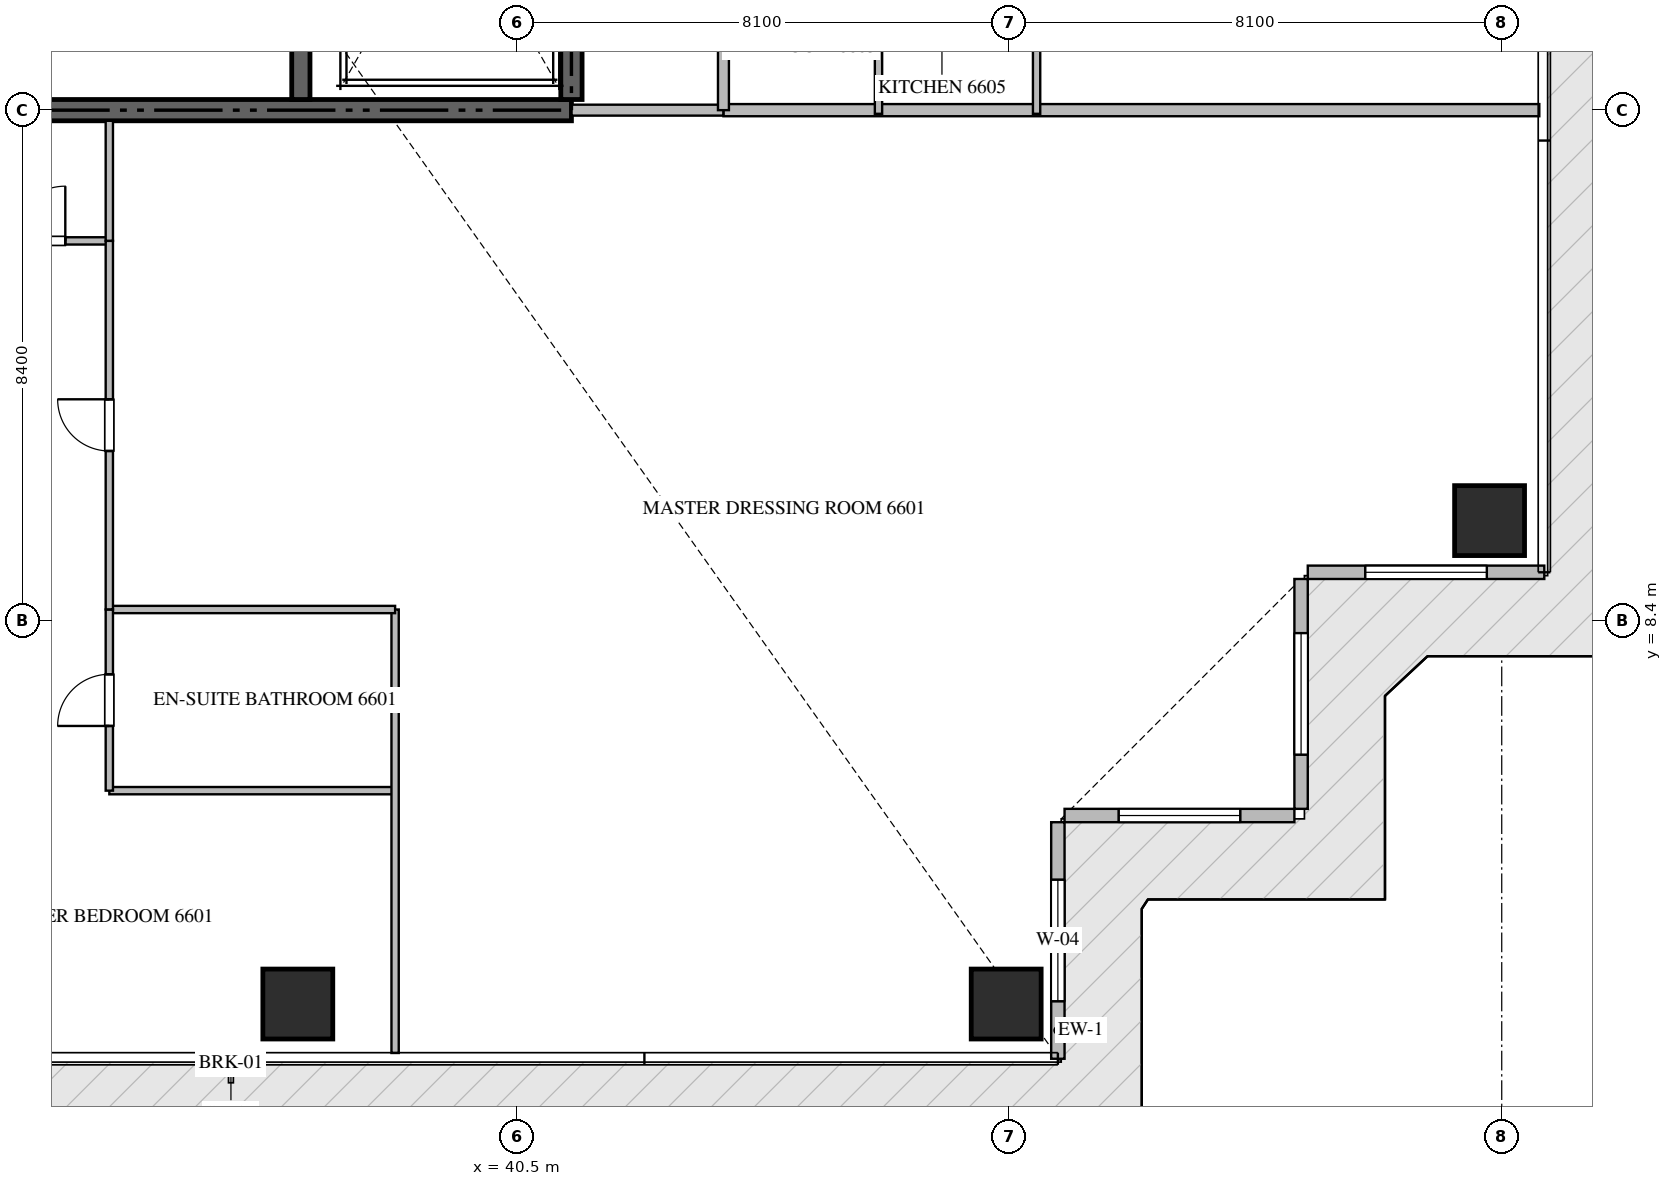
"""IFC4 building model, lengths in metres.
Left out: names, types, materials, properties, quantities, classifications, styles, units other than length and angle.
Written with IfcOpenShell. Run it as: python <this file> out.ifc"""

import sys

from ifc_helpers import new_model, si_unit, direction, frame, frame_2d, origin, origin_2d, place, context, subcontext, project, spatial, rectangle, extrude, source, transform, mapped, element, fill, save


model = new_model("IFC4")
c1 = context("Model", 3, precision=1e-05, world=origin(), true_north=direction((0.0, 1.0)))
c2 = subcontext(c1, "Body", "Model", "MODEL_VIEW")
j1 = project(units=[si_unit("LENGTHUNIT", "METRE"), si_unit("PLANEANGLEUNIT", "RADIAN")], contexts=[c1])
p1 = place(None, origin())
s1 = spatial("IfcSite", under=j1, at=p1, CompositionType="ELEMENT")
p2 = place(p1, origin())
s2 = spatial("IfcBuilding", under=s1, at=p2, CompositionType="ELEMENT")
p3 = place(p2, frame((0.0, 0.0, 264.35)))
s3 = spatial("IfcBuildingStorey", under=s2, at=p3, CompositionType="ELEMENT", Elevation=264.35)
p4 = place(p3, frame((23.4, 16.8, -0.26), z_axis=(0.0, 0.0, 1.0), x_axis=(1.0, 0.0, 0.0)))
e1 = element("IfcWall", 1, at=p4, inside=s3, PredefinedType="SHEAR", context=c2, shape_type="SweptSolid", body=[
    extrude(rectangle(XDim=18.0, YDim=0.35, at=frame_2d((9.0, 0.0))), origin(), (0.0, 0.0, 1.0), 3.848),
])
p5 = place(p3, frame((41.4, 16.975, -0.26), z_axis=(0.0, 0.0, 1.0), x_axis=(0.0, 1.0, 0.0)))
e2 = element("IfcWall", 2, at=p5, inside=s3, PredefinedType="SHEAR", context=c2, shape_type="SweptSolid", body=[
    extrude(rectangle(XDim=8.375, YDim=0.35, at=frame_2d((4.188, 0.0))), origin(), (0.0, 0.0, 1.0), 3.848),
])
p6 = place(p3, frame((36.95, 16.975, -0.26), z_axis=(0.0, 0.0, 1.0), x_axis=(0.0, 1.0, 0.0)))
e3 = element("IfcWall", 3, at=p6, inside=s3, PredefinedType="SHEAR", context=c2, shape_type="SweptSolid", body=[
    extrude(rectangle(XDim=8.375, YDim=0.3, at=frame_2d((4.188, 0.0))), origin(), (0.0, 0.0, 1.0), 3.848),
])
m1 = source(origin(), c2, "Body", "SweptSolid", [
    extrude(rectangle(XDim=1.15, YDim=1.15, at=origin_2d()), origin(), (0.0, 0.0, 1.0), 3.85),
])
for number, where, z_axis, x_axis in (
    (4, (36.9, 2.1, -0.26), (0.0, 0.0, 1.0), (1.0, 0.0, 0.0)),
    (5, (48.55, 2.1, -0.26), (0.0, 0.0, 1.0), (1.0, 0.0, 0.0)),
    (6, (56.5, 10.05, -0.26), (0.0, 0.0, 1.0), (1.0, 0.0, 0.0)),
):
    element("IfcColumn", number, at=place(p3, frame(where, z_axis=z_axis, x_axis=x_axis)), inside=s3, PredefinedType="COLUMN", context=c2, shape_type="MappedRepresentation", body=[
        mapped(m1, transform((0.0, 0.0, 0.0), scale=1.0)),
    ])
p7 = place(p3, frame((49.4, 1.2, 0.0), z_axis=(0.0, 0.0, 1.0), x_axis=(0.0, 1.0, 0.0)))
e7 = element("IfcWall", 7, at=p7, inside=s3, PredefinedType="ELEMENTEDWALL", context=c2, shape_type="SweptSolid", body=[
    extrude(rectangle(XDim=3.89, YDim=0.22, at=frame_2d((1.945, 0.0))), origin(), (0.0, 0.0, 1.0), 3.575),
])
p8 = place(p7, frame((0.945, 0.0, 0.65)))
e8 = element("IfcOpeningElement", 8, at=p8, cuts=e7, PredefinedType="OPENING", context=c2, shape_type="SweptSolid", body=[
    extrude(rectangle(XDim=2.0, YDim=2.2, at=frame_2d((1.0, 1.1))), frame((0.0, 0.12, 0.0), z_axis=(0.0, -1.0, 0.0), x_axis=(1.0, 0.0, 0.0)), (0.0, 0.0, 1.0), 0.24),
])
p9 = place(p3, frame((49.51, 5.2, 0.0), z_axis=(0.0, 0.0, 1.0), x_axis=(1.0, 0.0, 0.0)))
e9 = element("IfcWall", 9, at=p9, inside=s3, PredefinedType="ELEMENTEDWALL", context=c2, shape_type="SweptSolid", body=[
    extrude(rectangle(XDim=3.78, YDim=0.22, at=frame_2d((1.89, 0.0))), origin(), (0.0, 0.0, 1.0), 3.575),
])
p10 = place(p9, frame((0.89, 0.0, 0.65)))
e10 = element("IfcOpeningElement", 10, at=p10, cuts=e9, PredefinedType="OPENING", context=c2, shape_type="SweptSolid", body=[
    extrude(rectangle(XDim=2.0, YDim=2.2, at=frame_2d((1.0, 1.1))), frame((0.0, 0.12, 0.0), z_axis=(0.0, -1.0, 0.0), x_axis=(1.0, 0.0, 0.0)), (0.0, 0.0, 1.0), 0.24),
])
p11 = place(p3, frame((53.4, 5.31, 0.0), z_axis=(0.0, 0.0, 1.0), x_axis=(0.0, 1.0, 0.0)))
e11 = element("IfcWall", 11, at=p11, inside=s3, PredefinedType="ELEMENTEDWALL", context=c2, shape_type="SweptSolid", body=[
    extrude(rectangle(XDim=3.78, YDim=0.22, at=frame_2d((1.89, 0.0))), origin(), (0.0, 0.0, 1.0), 3.575),
])
p12 = place(p11, frame((0.89, 0.0, 0.65)))
e12 = element("IfcOpeningElement", 12, at=p12, cuts=e11, PredefinedType="OPENING", context=c2, shape_type="SweptSolid", body=[
    extrude(rectangle(XDim=2.0, YDim=2.2, at=frame_2d((1.0, 1.1))), frame((0.0, 0.12, 0.0), z_axis=(0.0, -1.0, 0.0), x_axis=(1.0, 0.0, 0.0)), (0.0, 0.0, 1.0), 0.24),
])
p13 = place(p3, frame((53.51, 9.2, 0.0), z_axis=(0.0, 0.0, 1.0), x_axis=(1.0, 0.0, 0.0)))
e13 = element("IfcWall", 13, at=p13, inside=s3, PredefinedType="ELEMENTEDWALL", context=c2, shape_type="SweptSolid", body=[
    extrude(rectangle(XDim=3.89, YDim=0.22, at=frame_2d((1.945, 0.0))), origin(), (0.0, 0.0, 1.0), 3.575),
])
p14 = place(p13, frame((0.945, 0.0, 0.65)))
e14 = element("IfcOpeningElement", 14, at=p14, cuts=e13, PredefinedType="OPENING", context=c2, shape_type="SweptSolid", body=[
    extrude(rectangle(XDim=2.0, YDim=2.2, at=frame_2d((1.0, 1.1))), frame((0.0, 0.12, 0.0), z_axis=(0.0, -1.0, 0.0), x_axis=(1.0, 0.0, 0.0)), (0.0, 0.0, 1.0), 0.24),
])
p15 = place(p3, frame((43.9, 16.8, 0.0), z_axis=(0.0, 0.0, 1.0), x_axis=(1.0, 0.0, 0.0)))
e15 = element("IfcWall", 15, at=p15, inside=s3, PredefinedType="PARTITIONING", context=c2, shape_type="SweptSolid", body=[
    extrude(rectangle(XDim=13.418, YDim=0.2, at=frame_2d((6.709, 0.0))), origin(), (0.0, 0.0, 1.0), 3.59),
])
p16 = place(p3, frame((41.402, 16.8, 0.0), z_axis=(0.0, 0.0, 1.0), x_axis=(1.0, 0.0, 0.0)))
e16 = element("IfcWall", 16, at=p16, inside=s3, PredefinedType="PARTITIONING", context=c2, shape_type="SweptSolid", body=[
    extrude(rectangle(XDim=2.496, YDim=0.18, at=frame_2d((1.248, 0.0))), origin(), (0.0, 0.0, 1.0), 3.59),
])
p17 = place(p3, frame((43.9, 16.8, 0.0), z_axis=(0.0, 0.0, 1.0), x_axis=(0.0, 1.0, 0.0)))
e17 = element("IfcWall", 17, at=p17, inside=s3, PredefinedType="PARTITIONING", context=c2, shape_type="SweptSolid", body=[
    extrude(rectangle(XDim=16.8, YDim=0.18, at=frame_2d((8.4, 0.0))), origin(), (0.0, 0.0, 1.0), 3.59),
])
p18 = place(p17, frame((4.993, 0.0, 0.0)))
e18 = element("IfcOpeningElement", 18, at=p18, cuts=e17, PredefinedType="OPENING", context=c2, shape_type="SweptSolid", body=[
    extrude(rectangle(XDim=1.0, YDim=2.15, at=frame_2d((0.5, 1.075))), frame((0.0, 0.1, 0.0), z_axis=(0.0, -1.0, 0.0), x_axis=(1.0, 0.0, 0.0)), (0.0, 0.0, 1.0), 0.2),
])
p19 = place(p17, frame((13.351, 0.0, 0.0)))
e19 = element("IfcOpeningElement", 19, at=p19, cuts=e17, PredefinedType="OPENING", context=c2, shape_type="SweptSolid", body=[
    extrude(rectangle(XDim=1.0, YDim=2.15, at=frame_2d((0.5, 1.075))), frame((0.0, 0.1, 0.0), z_axis=(0.0, -1.0, 0.0), x_axis=(1.0, 0.0, 0.0)), (0.0, 0.0, 1.0), 0.2),
])
p20 = place(p3, frame((31.452, 14.65, 0.0), z_axis=(0.0, 0.0, 1.0), x_axis=(1.0, 0.0, 0.0)))
e20 = element("IfcWall", 20, at=p20, inside=s3, PredefinedType="PARTITIONING", context=c2, shape_type="SweptSolid", body=[
    extrude(rectangle(XDim=2.348, YDim=0.12, at=frame_2d((1.174, 0.0))), origin(), (0.0, 0.0, 1.0), 3.59),
])
p21 = place(p20, frame((0.724, 0.0, 0.0)))
e21 = element("IfcOpeningElement", 21, at=p21, cuts=e20, PredefinedType="OPENING", context=c2, shape_type="SweptSolid", body=[
    extrude(rectangle(XDim=0.9, YDim=2.1, at=frame_2d((0.45, 1.05))), frame((0.0, 0.07, 0.0), z_axis=(0.0, -1.0, 0.0), x_axis=(1.0, 0.0, 0.0)), (0.0, 0.0, 1.0), 0.14),
])
p22 = place(p3, frame((33.8, 5.609, 0.0), z_axis=(0.0, 0.0, 1.0), x_axis=(1.0, 0.0, 0.0)))
e22 = element("IfcWall", 22, at=p22, inside=s3, PredefinedType="PARTITIONING", context=c2, shape_type="SweptSolid", body=[
    extrude(rectangle(XDim=4.7, YDim=0.12, at=frame_2d((2.35, 0.0))), origin(), (0.0, 0.0, 1.0), 3.59),
])
p23 = place(p3, frame((38.5, 1.295, 0.0), z_axis=(0.0, 0.0, 1.0), x_axis=(0.0, 1.0, 0.0)))
e23 = element("IfcWall", 23, at=p23, inside=s3, PredefinedType="PARTITIONING", context=c2, shape_type="SweptSolid", body=[
    extrude(rectangle(XDim=7.293, YDim=0.12, at=frame_2d((3.646, 0.0))), origin(), (0.0, 0.0, 1.0), 3.59),
])
p24 = place(p3, frame((33.8, 8.588, 0.0), z_axis=(0.0, 0.0, 1.0), x_axis=(1.0, 0.0, 0.0)))
e24 = element("IfcWall", 24, at=p24, inside=s3, PredefinedType="PARTITIONING", context=c2, shape_type="SweptSolid", body=[
    extrude(rectangle(XDim=4.7, YDim=0.12, at=frame_2d((2.35, 0.0))), origin(), (0.0, 0.0, 1.0), 3.59),
])
p25 = place(p3, frame((33.8, 5.609, 0.0), z_axis=(0.0, 0.0, 1.0), x_axis=(0.0, 1.0, 0.0)))
e25 = element("IfcWall", 25, at=p25, inside=s3, PredefinedType="PARTITIONING", context=c2, shape_type="SweptSolid", body=[
    extrude(rectangle(XDim=2.979, YDim=0.12, at=frame_2d((1.49, 0.0))), origin(), (0.0, 0.0, 1.0), 3.59),
])
p26 = place(p25, frame((1.064, 0.0, 0.0)))
e26 = element("IfcOpeningElement", 26, at=p26, cuts=e25, PredefinedType="OPENING", context=c2, shape_type="SweptSolid", body=[
    extrude(rectangle(XDim=0.85, YDim=2.1, at=frame_2d((0.425, 1.05))), frame((0.0, 0.07, 0.0), z_axis=(0.0, -1.0, 0.0), x_axis=(1.0, 0.0, 0.0)), (0.0, 0.0, 1.0), 0.14),
])
p27 = place(p3, frame((33.8, 8.59, 0.0), z_axis=(0.0, 0.0, 1.0), x_axis=(0.0, 1.0, 0.0)))
e27 = element("IfcWall", 27, at=p27, inside=s3, PredefinedType="PARTITIONING", context=c2, shape_type="SweptSolid", body=[
    extrude(rectangle(XDim=6.06, YDim=0.12, at=frame_2d((3.03, 0.0))), origin(), (0.0, 0.0, 1.0), 3.59),
])
p28 = place(p27, frame((2.605, 0.0, 0.0)))
e28 = element("IfcOpeningElement", 28, at=p28, cuts=e27, PredefinedType="OPENING", context=c2, shape_type="SweptSolid", body=[
    extrude(rectangle(XDim=0.85, YDim=2.1, at=frame_2d((0.425, 1.05))), frame((0.0, 0.07, 0.0), z_axis=(0.0, -1.0, 0.0), x_axis=(1.0, 0.0, 0.0)), (0.0, 0.0, 1.0), 0.14),
])
p29 = place(p3, frame((33.8, 14.652, 0.0), z_axis=(0.0, 0.0, 1.0), x_axis=(0.0, 1.0, 0.0)))
e29 = element("IfcWall", 29, at=p29, inside=s3, PredefinedType="PARTITIONING", context=c2, shape_type="SweptSolid", body=[
    extrude(rectangle(XDim=1.973, YDim=0.12, at=frame_2d((0.986, 0.0))), origin(), (0.0, 0.0, 1.0), 3.59),
])
for number, where, z_axis, x_axis in (
    (30, (46.45, 16.74, 0.0), (0.0, 0.0, 1.0), (0.0, 1.0, 0.0)),
    (31, (49.05, 16.74, 0.0), (0.0, 0.0, 1.0), (0.0, 1.0, 0.0)),
):
    element("IfcWall", number, at=place(p3, frame(where, z_axis=z_axis, x_axis=x_axis)), inside=s3, PredefinedType="PARTITIONING", context=c2, shape_type="SweptSolid", body=[
        extrude(rectangle(XDim=2.66, YDim=0.12, at=frame_2d((1.33, 0.0))), origin(), (0.0, 0.0, 1.0), 3.59),
    ])
m2 = source(origin(), c2, "Body", "SweptSolid", [
    extrude(rectangle(XDim=2.0, YDim=2.2, at=frame_2d((1.0, 1.1))), frame((0.0, 0.03, 0.0), z_axis=(0.0, -1.0, 0.0), x_axis=(1.0, 0.0, 0.0)), (0.0, 0.0, 1.0), 0.06),
])
p30 = place(p8, origin())
e32 = element("IfcWindow", 32, at=p30, inside=s3, PartitioningType="SINGLE_PANEL", PredefinedType="WINDOW", context=c2, shape_type="MappedRepresentation", body=[
    mapped(m2, transform((0.0, 0.0, 0.0), scale=1.0)),
])
fill(e8, e32)
p31 = place(p10, origin())
e33 = element("IfcWindow", 33, at=p31, inside=s3, PartitioningType="SINGLE_PANEL", PredefinedType="WINDOW", context=c2, shape_type="MappedRepresentation", body=[
    mapped(m2, transform((0.0, 0.0, 0.0), scale=1.0)),
])
fill(e10, e33)
p32 = place(p12, origin())
e34 = element("IfcWindow", 34, at=p32, inside=s3, PartitioningType="SINGLE_PANEL", PredefinedType="WINDOW", context=c2, shape_type="MappedRepresentation", body=[
    mapped(m2, transform((0.0, 0.0, 0.0), scale=1.0)),
])
fill(e12, e34)
p33 = place(p14, origin())
e35 = element("IfcWindow", 35, at=p33, inside=s3, PartitioningType="SINGLE_PANEL", PredefinedType="WINDOW", context=c2, shape_type="MappedRepresentation", body=[
    mapped(m2, transform((0.0, 0.0, 0.0), scale=1.0)),
])
fill(e14, e35)
m3 = source(origin(), c2, "Body", "SweptSolid", [
    extrude(rectangle(XDim=0.9, YDim=2.1, at=frame_2d((0.45, 1.05))), frame((0.0, 0.025, 0.0), z_axis=(0.0, -1.0, 0.0), x_axis=(1.0, 0.0, 0.0)), (0.0, 0.0, 1.0), 0.05),
])
p34 = place(p21, origin())
e36 = element("IfcDoor", 36, at=p34, inside=s3, OperationType="SINGLE_SWING_RIGHT", PredefinedType="DOOR", context=c2, shape_type="MappedRepresentation", body=[
    mapped(m3, transform((0.0, 0.0, 0.0), scale=1.0)),
])
fill(e21, e36)
m4 = source(origin(), c2, "Body", "SweptSolid", [
    extrude(rectangle(XDim=0.85, YDim=2.1, at=frame_2d((0.425, 1.05))), frame((0.0, 0.025, 0.0), z_axis=(0.0, -1.0, 0.0), x_axis=(1.0, 0.0, 0.0)), (0.0, 0.0, 1.0), 0.05),
])
p35 = place(p26, origin())
e37 = element("IfcDoor", 37, at=p35, inside=s3, OperationType="SINGLE_SWING_LEFT", PredefinedType="DOOR", context=c2, shape_type="MappedRepresentation", body=[
    mapped(m4, transform((0.0, 0.0, 0.0), scale=1.0)),
])
fill(e26, e37)
p36 = place(p28, origin())
e38 = element("IfcDoor", 38, at=p36, inside=s3, OperationType="SINGLE_SWING_RIGHT", PredefinedType="DOOR", context=c2, shape_type="MappedRepresentation", body=[
    mapped(m4, transform((0.0, 0.0, 0.0), scale=1.0)),
])
fill(e28, e38)
save(model, sys.argv[1])
